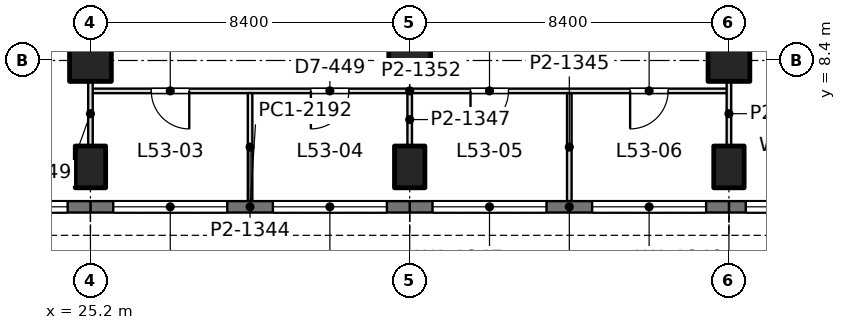
"""IFC4 building model, lengths in metres.
Left out: names, types, materials, properties, quantities, classifications, styles, units other than length and angle.
Written with IfcOpenShell. Run it as: python <this file> out.ifc"""

import sys

from ifc_helpers import new_model, si_unit, direction, frame, frame_2d, origin, origin_2d, place, context, subcontext, project, spatial, rectangle, extrude, element, fill, save


model = new_model("IFC4")
c1 = context("Model", 3, precision=1e-05, world=origin(), true_north=direction((0.0, 1.0)))
c2 = subcontext(c1, "Body", "Model", "MODEL_VIEW")
j1 = project(units=[si_unit("LENGTHUNIT", "METRE"), si_unit("PLANEANGLEUNIT", "RADIAN")], contexts=[c1])
p1 = place(None, origin())
s1 = spatial("IfcSite", under=j1, at=p1, CompositionType="ELEMENT")
p2 = place(p1, origin())
s2 = spatial("IfcBuilding", under=s1, at=p2, CompositionType="ELEMENT")
p3 = place(p2, frame((0.0, 0.0, 232.2)))
s3 = spatial("IfcBuildingStorey", under=s2, at=p3, CompositionType="ELEMENT", Elevation=232.2)
p4 = place(p3, frame((25.2, 5.6, 0.0), z_axis=(0.0, 0.0, 1.0), x_axis=(1.0, 0.0, 0.0)))
e1 = element("IfcColumn", 1, at=p4, inside=s3, PredefinedType="COLUMN", context=c2, shape_type="SweptSolid", body=[
    extrude(rectangle(XDim=0.8, YDim=1.1, at=origin_2d()), origin(), (0.0, 0.0, 1.0), 4.2),
])
p5 = place(p3, frame((25.2, 8.4, 0.0), z_axis=(0.0, 0.0, 1.0), x_axis=(1.0, 0.0, 0.0)))
e2 = element("IfcColumn", 2, at=p5, inside=s3, PredefinedType="COLUMN", context=c2, shape_type="SweptSolid", body=[
    extrude(rectangle(XDim=1.1, YDim=1.1, at=origin_2d()), origin(), (0.0, 0.0, 1.0), 4.2),
])
p6 = place(p3, frame((33.6, 5.6, 0.0), z_axis=(0.0, 0.0, 1.0), x_axis=(1.0, 0.0, 0.0)))
e3 = element("IfcColumn", 3, at=p6, inside=s3, PredefinedType="COLUMN", context=c2, shape_type="SweptSolid", body=[
    extrude(rectangle(XDim=0.8, YDim=1.1, at=origin_2d()), origin(), (0.0, 0.0, 1.0), 4.2),
])
p7 = place(p3, frame((33.6, 8.4, 0.0), z_axis=(0.0, 0.0, 1.0), x_axis=(1.0, 0.0, 0.0)))
e4 = element("IfcColumn", 4, at=p7, inside=s3, PredefinedType="COLUMN", context=c2, shape_type="SweptSolid", body=[
    extrude(rectangle(XDim=1.1, YDim=1.1, at=origin_2d()), origin(), (0.0, 0.0, 1.0), 4.2),
])
p8 = place(p3, frame((42.0, 5.6, 0.0), z_axis=(0.0, 0.0, 1.0), x_axis=(1.0, 0.0, 0.0)))
e5 = element("IfcColumn", 5, at=p8, inside=s3, PredefinedType="COLUMN", context=c2, shape_type="SweptSolid", body=[
    extrude(rectangle(XDim=0.8, YDim=1.1, at=origin_2d()), origin(), (0.0, 0.0, 1.0), 4.2),
])
p9 = place(p3, frame((42.0, 8.4, 0.0), z_axis=(0.0, 0.0, 1.0), x_axis=(1.0, 0.0, 0.0)))
e6 = element("IfcColumn", 6, at=p9, inside=s3, PredefinedType="COLUMN", context=c2, shape_type="SweptSolid", body=[
    extrude(rectangle(XDim=1.1, YDim=1.1, at=origin_2d()), origin(), (0.0, 0.0, 1.0), 4.2),
])
p10 = place(p3, frame((50.085, 4.55, 0.0), z_axis=(0.0, 0.0, 1.0), x_axis=(-1.0, 0.0, 0.0)))
e7 = element("IfcWall", 7, at=p10, inside=s3, PredefinedType="SOLIDWALL", context=c2, shape_type="SweptSolid", body=[
    extrude(rectangle(XDim=8.085, YDim=0.3, at=frame_2d((4.042, 0.0))), origin(), (0.0, 0.0, 1.0), 4.05),
])
p11 = place(p10, frame((0.443, 0.0, 0.9)))
e8 = element("IfcOpeningElement", 8, at=p11, cuts=e7, PredefinedType="OPENING", context=c2, shape_type="SweptSolid", body=[
    extrude(rectangle(XDim=3.0, YDim=1.9, at=frame_2d((1.5, 0.95))), frame((0.0, 0.16, 0.0), z_axis=(0.0, -1.0, 0.0), x_axis=(1.0, 0.0, 0.0)), (0.0, 0.0, 1.0), 0.32),
])
p12 = place(p10, frame((4.643, 0.0, 0.9)))
e9 = element("IfcOpeningElement", 9, at=p12, cuts=e7, PredefinedType="OPENING", context=c2, shape_type="SweptSolid", body=[
    extrude(rectangle(XDim=3.0, YDim=1.9, at=frame_2d((1.5, 0.95))), frame((0.0, 0.16, 0.0), z_axis=(0.0, -1.0, 0.0), x_axis=(1.0, 0.0, 0.0)), (0.0, 0.0, 1.0), 0.32),
])
p13 = place(p3, frame((42.0, 4.55, 0.0), z_axis=(0.0, 0.0, 1.0), x_axis=(-1.0, 0.0, 0.0)))
e10 = element("IfcWall", 10, at=p13, inside=s3, PredefinedType="SOLIDWALL", context=c2, shape_type="SweptSolid", body=[
    extrude(rectangle(XDim=8.4, YDim=0.3, at=frame_2d((4.2, 0.0))), origin(), (0.0, 0.0, 1.0), 4.05),
])
p14 = place(p13, frame((0.6, 0.0, 0.9)))
e11 = element("IfcOpeningElement", 11, at=p14, cuts=e10, PredefinedType="OPENING", context=c2, shape_type="SweptSolid", body=[
    extrude(rectangle(XDim=3.0, YDim=1.9, at=frame_2d((1.5, 0.95))), frame((0.0, 0.16, 0.0), z_axis=(0.0, -1.0, 0.0), x_axis=(1.0, 0.0, 0.0)), (0.0, 0.0, 1.0), 0.32),
])
p15 = place(p13, frame((4.8, 0.0, 0.9)))
e12 = element("IfcOpeningElement", 12, at=p15, cuts=e10, PredefinedType="OPENING", context=c2, shape_type="SweptSolid", body=[
    extrude(rectangle(XDim=3.0, YDim=1.9, at=frame_2d((1.5, 0.95))), frame((0.0, 0.16, 0.0), z_axis=(0.0, -1.0, 0.0), x_axis=(1.0, 0.0, 0.0)), (0.0, 0.0, 1.0), 0.32),
])
p16 = place(p3, frame((33.6, 4.55, 0.0), z_axis=(0.0, 0.0, 1.0), x_axis=(-1.0, 0.0, 0.0)))
e13 = element("IfcWall", 13, at=p16, inside=s3, PredefinedType="SOLIDWALL", context=c2, shape_type="SweptSolid", body=[
    extrude(rectangle(XDim=8.4, YDim=0.3, at=frame_2d((4.2, 0.0))), origin(), (0.0, 0.0, 1.0), 4.05),
])
p17 = place(p16, frame((0.6, 0.0, 0.9)))
e14 = element("IfcOpeningElement", 14, at=p17, cuts=e13, PredefinedType="OPENING", context=c2, shape_type="SweptSolid", body=[
    extrude(rectangle(XDim=3.0, YDim=1.9, at=frame_2d((1.5, 0.95))), frame((0.0, 0.16, 0.0), z_axis=(0.0, -1.0, 0.0), x_axis=(1.0, 0.0, 0.0)), (0.0, 0.0, 1.0), 0.32),
])
p18 = place(p16, frame((4.8, 0.0, 0.9)))
e15 = element("IfcOpeningElement", 15, at=p18, cuts=e13, PredefinedType="OPENING", context=c2, shape_type="SweptSolid", body=[
    extrude(rectangle(XDim=3.0, YDim=1.9, at=frame_2d((1.5, 0.95))), frame((0.0, 0.16, 0.0), z_axis=(0.0, -1.0, 0.0), x_axis=(1.0, 0.0, 0.0)), (0.0, 0.0, 1.0), 0.32),
])
p19 = place(p3, frame((25.2, 4.55, 0.0), z_axis=(0.0, 0.0, 1.0), x_axis=(-1.0, 0.0, 0.0)))
e16 = element("IfcWall", 16, at=p19, inside=s3, PredefinedType="SOLIDWALL", context=c2, shape_type="SweptSolid", body=[
    extrude(rectangle(XDim=8.4, YDim=0.3, at=frame_2d((4.2, 0.0))), origin(), (0.0, 0.0, 1.0), 4.05),
])
p20 = place(p19, frame((0.6, 0.0, 0.9)))
e17 = element("IfcOpeningElement", 17, at=p20, cuts=e16, PredefinedType="OPENING", context=c2, shape_type="SweptSolid", body=[
    extrude(rectangle(XDim=3.0, YDim=1.9, at=frame_2d((1.5, 0.95))), frame((0.0, 0.16, 0.0), z_axis=(0.0, -1.0, 0.0), x_axis=(1.0, 0.0, 0.0)), (0.0, 0.0, 1.0), 0.32),
])
p21 = place(p19, frame((4.8, 0.0, 0.9)))
e18 = element("IfcOpeningElement", 18, at=p21, cuts=e16, PredefinedType="OPENING", context=c2, shape_type="SweptSolid", body=[
    extrude(rectangle(XDim=3.0, YDim=1.9, at=frame_2d((1.5, 0.95))), frame((0.0, 0.16, 0.0), z_axis=(0.0, -1.0, 0.0), x_axis=(1.0, 0.0, 0.0)), (0.0, 0.0, 1.0), 0.32),
])
p22 = place(p3, frame((25.2, 7.6, 0.0), z_axis=(0.0, 0.0, 1.0), x_axis=(1.0, 0.0, 0.0)))
e19 = element("IfcWall", 19, at=p22, inside=s3, PredefinedType="PARTITIONING", context=c2, shape_type="SweptSolid", body=[
    extrude(rectangle(XDim=16.8, YDim=0.12, at=frame_2d((8.4, 0.0))), origin(), (0.0, 0.0, 1.0), 3.69),
])
p23 = place(p22, frame((1.6, 0.0, 0.0)))
e20 = element("IfcOpeningElement", 20, at=p23, cuts=e19, PredefinedType="OPENING", context=c2, shape_type="SweptSolid", body=[
    extrude(rectangle(XDim=1.0, YDim=2.4, at=frame_2d((0.5, 1.2))), frame((0.0, 0.07, 0.0), z_axis=(0.0, -1.0, 0.0), x_axis=(1.0, 0.0, 0.0)), (0.0, 0.0, 1.0), 0.14),
])
p24 = place(p22, frame((5.8, 0.0, 0.0)))
e21 = element("IfcOpeningElement", 21, at=p24, cuts=e19, PredefinedType="OPENING", context=c2, shape_type="SweptSolid", body=[
    extrude(rectangle(XDim=1.0, YDim=2.4, at=frame_2d((0.5, 1.2))), frame((0.0, 0.07, 0.0), z_axis=(0.0, -1.0, 0.0), x_axis=(1.0, 0.0, 0.0)), (0.0, 0.0, 1.0), 0.14),
])
p25 = place(p22, frame((10.0, 0.0, 0.0)))
e22 = element("IfcOpeningElement", 22, at=p25, cuts=e19, PredefinedType="OPENING", context=c2, shape_type="SweptSolid", body=[
    extrude(rectangle(XDim=1.0, YDim=2.4, at=frame_2d((0.5, 1.2))), frame((0.0, 0.07, 0.0), z_axis=(0.0, -1.0, 0.0), x_axis=(1.0, 0.0, 0.0)), (0.0, 0.0, 1.0), 0.14),
])
p26 = place(p22, frame((14.2, 0.0, 0.0)))
e23 = element("IfcOpeningElement", 23, at=p26, cuts=e19, PredefinedType="OPENING", context=c2, shape_type="SweptSolid", body=[
    extrude(rectangle(XDim=1.0, YDim=2.4, at=frame_2d((0.5, 1.2))), frame((0.0, 0.07, 0.0), z_axis=(0.0, -1.0, 0.0), x_axis=(1.0, 0.0, 0.0)), (0.0, 0.0, 1.0), 0.14),
])
p27 = place(p3, frame((25.2, 6.149, 0.0), z_axis=(0.0, 0.0, 1.0), x_axis=(0.0, 1.0, 0.0)))
e24 = element("IfcWall", 24, at=p27, inside=s3, PredefinedType="PARTITIONING", context=c2, shape_type="SweptSolid", body=[
    extrude(rectangle(XDim=1.703, YDim=0.12, at=frame_2d((0.852, 0.0))), origin(), (0.0, 0.0, 1.0), 3.69),
])
p28 = place(p3, frame((29.4, 4.7, 0.0), z_axis=(0.0, 0.0, 1.0), x_axis=(0.0, 1.0, 0.0)))
e25 = element("IfcWall", 25, at=p28, inside=s3, PredefinedType="PARTITIONING", context=c2, shape_type="SweptSolid", body=[
    extrude(rectangle(XDim=2.842, YDim=0.12, at=frame_2d((1.421, 0.0))), origin(), (0.0, 0.0, 1.0), 3.56),
])
p29 = place(p3, frame((33.6, 6.149, 0.0), z_axis=(0.0, 0.0, 1.0), x_axis=(0.0, 1.0, 0.0)))
e26 = element("IfcWall", 26, at=p29, inside=s3, PredefinedType="PARTITIONING", context=c2, shape_type="SweptSolid", body=[
    extrude(rectangle(XDim=1.393, YDim=0.12, at=frame_2d((0.697, 0.0))), origin(), (0.0, 0.0, 1.0), 3.69),
])
p30 = place(p3, frame((37.8, 4.7, 0.0), z_axis=(0.0, 0.0, 1.0), x_axis=(0.0, 1.0, 0.0)))
e27 = element("IfcWall", 27, at=p30, inside=s3, PredefinedType="PARTITIONING", context=c2, shape_type="SweptSolid", body=[
    extrude(rectangle(XDim=2.842, YDim=0.12, at=frame_2d((1.421, 0.0))), origin(), (0.0, 0.0, 1.0), 3.56),
])
p31 = place(p3, frame((42.0, 6.149, 0.0), z_axis=(0.0, 0.0, 1.0), x_axis=(0.0, 1.0, 0.0)))
e28 = element("IfcWall", 28, at=p31, inside=s3, PredefinedType="PARTITIONING", context=c2, shape_type="SweptSolid", body=[
    extrude(rectangle(XDim=1.703, YDim=0.12, at=frame_2d((0.852, 0.0))), origin(), (0.0, 0.0, 1.0), 3.69),
])
p32 = place(p12, origin())
e29 = element("IfcWindow", 29, at=p32, inside=s3, PartitioningType="SINGLE_PANEL", PredefinedType="WINDOW", context=c2, shape_type="SweptSolid", body=[
    extrude(rectangle(XDim=3.0, YDim=1.9, at=frame_2d((1.5, 0.95))), frame((0.0, 0.03, 0.0), z_axis=(0.0, -1.0, 0.0), x_axis=(1.0, 0.0, 0.0)), (0.0, 0.0, 1.0), 0.06),
])
fill(e9, e29)
p33 = place(p14, origin())
e30 = element("IfcWindow", 30, at=p33, inside=s3, PartitioningType="SINGLE_PANEL", PredefinedType="WINDOW", context=c2, shape_type="SweptSolid", body=[
    extrude(rectangle(XDim=3.0, YDim=1.9, at=frame_2d((1.5, 0.95))), frame((0.0, 0.03, 0.0), z_axis=(0.0, -1.0, 0.0), x_axis=(1.0, 0.0, 0.0)), (0.0, 0.0, 1.0), 0.06),
])
fill(e11, e30)
p34 = place(p15, origin())
e31 = element("IfcWindow", 31, at=p34, inside=s3, PartitioningType="SINGLE_PANEL", PredefinedType="WINDOW", context=c2, shape_type="SweptSolid", body=[
    extrude(rectangle(XDim=3.0, YDim=1.9, at=frame_2d((1.5, 0.95))), frame((0.0, 0.03, 0.0), z_axis=(0.0, -1.0, 0.0), x_axis=(1.0, 0.0, 0.0)), (0.0, 0.0, 1.0), 0.06),
])
fill(e12, e31)
p35 = place(p17, origin())
e32 = element("IfcWindow", 32, at=p35, inside=s3, PartitioningType="SINGLE_PANEL", PredefinedType="WINDOW", context=c2, shape_type="SweptSolid", body=[
    extrude(rectangle(XDim=3.0, YDim=1.9, at=frame_2d((1.5, 0.95))), frame((0.0, 0.03, 0.0), z_axis=(0.0, -1.0, 0.0), x_axis=(1.0, 0.0, 0.0)), (0.0, 0.0, 1.0), 0.06),
])
fill(e14, e32)
p36 = place(p18, origin())
e33 = element("IfcWindow", 33, at=p36, inside=s3, PartitioningType="SINGLE_PANEL", PredefinedType="WINDOW", context=c2, shape_type="SweptSolid", body=[
    extrude(rectangle(XDim=3.0, YDim=1.9, at=frame_2d((1.5, 0.95))), frame((0.0, 0.03, 0.0), z_axis=(0.0, -1.0, 0.0), x_axis=(1.0, 0.0, 0.0)), (0.0, 0.0, 1.0), 0.06),
])
fill(e15, e33)
p37 = place(p20, origin())
e34 = element("IfcWindow", 34, at=p37, inside=s3, PartitioningType="SINGLE_PANEL", PredefinedType="WINDOW", context=c2, shape_type="SweptSolid", body=[
    extrude(rectangle(XDim=3.0, YDim=1.9, at=frame_2d((1.5, 0.95))), frame((0.0, 0.03, 0.0), z_axis=(0.0, -1.0, 0.0), x_axis=(1.0, 0.0, 0.0)), (0.0, 0.0, 1.0), 0.06),
])
fill(e17, e34)
p38 = place(p23, frame((1.0, 0.0, 0.0), z_axis=(0.0, 0.0, 1.0), x_axis=(-1.0, 0.0, 0.0)))
e35 = element("IfcDoor", 35, at=p38, inside=s3, OperationType="SINGLE_SWING_LEFT", PredefinedType="DOOR", context=c2, shape_type="SweptSolid", body=[
    extrude(rectangle(XDim=1.0, YDim=2.4, at=frame_2d((0.5, 1.2))), frame((0.0, 0.025, 0.0), z_axis=(0.0, -1.0, 0.0), x_axis=(1.0, 0.0, 0.0)), (0.0, 0.0, 1.0), 0.05),
])
fill(e20, e35)
p39 = place(p24, frame((1.0, 0.0, 0.0), z_axis=(0.0, 0.0, 1.0), x_axis=(-1.0, 0.0, 0.0)))
e36 = element("IfcDoor", 36, at=p39, inside=s3, OperationType="SINGLE_SWING_RIGHT", PredefinedType="DOOR", context=c2, shape_type="SweptSolid", body=[
    extrude(rectangle(XDim=1.0, YDim=2.4, at=frame_2d((0.5, 1.2))), frame((0.0, 0.025, 0.0), z_axis=(0.0, -1.0, 0.0), x_axis=(1.0, 0.0, 0.0)), (0.0, 0.0, 1.0), 0.05),
])
fill(e21, e36)
p40 = place(p25, frame((1.0, 0.0, 0.0), z_axis=(0.0, 0.0, 1.0), x_axis=(-1.0, 0.0, 0.0)))
e37 = element("IfcDoor", 37, at=p40, inside=s3, OperationType="SINGLE_SWING_RIGHT", PredefinedType="DOOR", context=c2, shape_type="SweptSolid", body=[
    extrude(rectangle(XDim=1.0, YDim=2.4, at=frame_2d((0.5, 1.2))), frame((0.0, 0.025, 0.0), z_axis=(0.0, -1.0, 0.0), x_axis=(1.0, 0.0, 0.0)), (0.0, 0.0, 1.0), 0.05),
])
fill(e22, e37)
p41 = place(p26, frame((1.0, 0.0, 0.0), z_axis=(0.0, 0.0, 1.0), x_axis=(-1.0, 0.0, 0.0)))
e38 = element("IfcDoor", 38, at=p41, inside=s3, OperationType="SINGLE_SWING_RIGHT", PredefinedType="DOOR", context=c2, shape_type="SweptSolid", body=[
    extrude(rectangle(XDim=1.0, YDim=2.4, at=frame_2d((0.5, 1.2))), frame((0.0, 0.025, 0.0), z_axis=(0.0, -1.0, 0.0), x_axis=(1.0, 0.0, 0.0)), (0.0, 0.0, 1.0), 0.05),
])
fill(e23, e38)
save(model, sys.argv[1])
